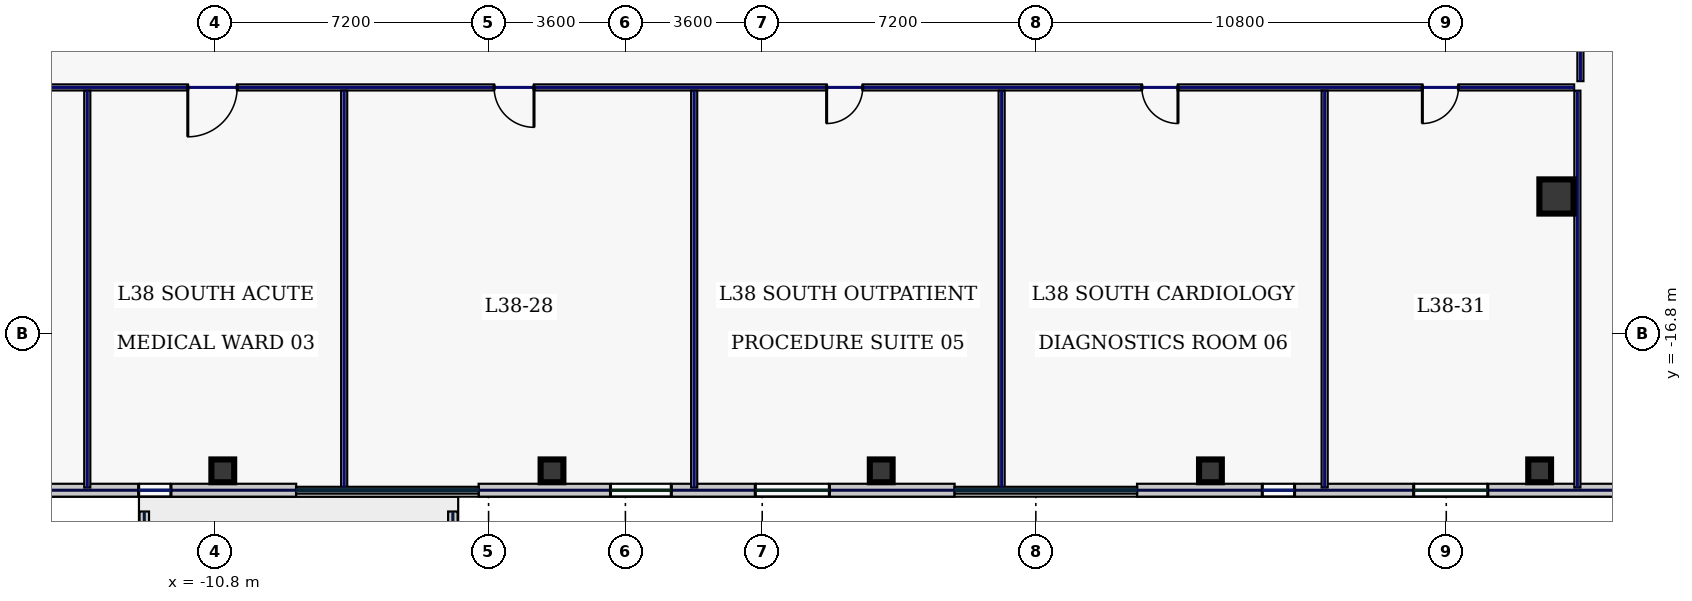
"""IFC4 building model, lengths in metres.
Left out: names, types, materials, properties, quantities, classifications, styles, units other than length and angle.
Written with IfcOpenShell. Run it as: python <this file> out.ifc"""

import sys

from ifc_helpers import new_model, si_unit, direction, frame, frame_2d, origin, origin_2d, place, context, subcontext, project, spatial, rectangle, hollow_rectangle, extrude, element, fill, save


model = new_model("IFC4")
c1 = context("Model", 3, precision=1e-05, world=origin(), true_north=direction((0.0, 1.0)))
c2 = subcontext(c1, "Body", "Model", "MODEL_VIEW")
j1 = project(units=[si_unit("LENGTHUNIT", "METRE"), si_unit("PLANEANGLEUNIT", "RADIAN")], contexts=[c1])
p1 = place(None, origin())
s1 = spatial("IfcSite", under=j1, at=p1, CompositionType="ELEMENT")
p2 = place(p1, origin())
s2 = spatial("IfcBuilding", under=s1, at=p2, CompositionType="ELEMENT")
p3 = place(p2, frame((0.0, 0.0, 168.2)))
s3 = spatial("IfcBuildingStorey", under=s2, at=p3, CompositionType="ELEMENT", Elevation=168.2)
p4 = place(p3, frame((24.5, -13.2, 0.0), z_axis=(0.0, 0.0, 1.0), x_axis=(1.0, 0.0, 0.0)))
e1 = element("IfcColumn", 1, at=p4, inside=s3, PredefinedType="COLUMN", context=c2, shape_type="SweptSolid", body=[
    extrude(hollow_rectangle(XDim=0.9, YDim=0.9, WallThickness=0.04, at=origin_2d()), origin(), (0.0, 0.0, 1.0), 3.74),
])
for number, where, z_axis, x_axis in (
    (2, (-10.594, -20.42, 0.0), (0.0, 0.0, 1.0), (1.0, 0.0, 0.0)),
    (3, (-1.931, -20.42, 0.0), (0.0, 0.0, 1.0), (1.0, 0.0, 0.0)),
    (4, (6.731, -20.42, 0.0), (0.0, 0.0, 1.0), (1.0, 0.0, 0.0)),
    (5, (15.394, -20.42, 0.0), (0.0, 0.0, 1.0), (1.0, 0.0, 0.0)),
    (6, (24.057, -20.42, 0.0), (0.0, 0.0, 1.0), (1.0, 0.0, 0.0)),
):
    element("IfcColumn", number, at=place(p3, frame(where, z_axis=z_axis, x_axis=x_axis)), inside=s3, PredefinedType="COLUMN", context=c2, shape_type="SweptSolid", body=[
        extrude(hollow_rectangle(XDim=0.6, YDim=0.6, WallThickness=0.028, at=origin_2d()), origin(), (0.0, 0.0, 1.0), 3.74),
    ])
for number, where, z_axis, x_axis in (
    (7, (-12.66, -21.49, 0.0), (0.0, 0.0, 1.0), (0.0, -1.0, 0.0)),
    (8, (-4.54, -23.67, 0.0), (0.0, 0.0, 1.0), (0.0, 1.0, 0.0)),
):
    element("IfcWall", number, at=place(p3, frame(where, z_axis=z_axis, x_axis=x_axis)), inside=s3, PredefinedType="PARAPET", context=c2, shape_type="SweptSolid", body=[
        extrude(rectangle(XDim=2.18, YDim=0.25, at=frame_2d((1.09, 0.0))), origin(), (0.0, 0.0, 1.0), 1.15),
    ])
p5 = place(p3, frame((-28.6, -20.93, 0.0), z_axis=(0.0, 0.0, 1.0), x_axis=(1.0, 0.0, 0.0)))
e9 = element("IfcWall", 9, at=p5, inside=s3, PredefinedType="STANDARD", context=c2, shape_type="SweptSolid", body=[
    extrude(rectangle(XDim=19.937, YDim=0.34, at=frame_2d((9.969, 0.0))), origin(), (0.0, 0.0, 1.0), 3.74),
])
p6 = place(p5, frame((2.044, 0.0, 0.8)))
e10 = element("IfcOpeningElement", 10, at=p6, cuts=e9, PredefinedType="OPENING", context=c2, shape_type="SweptSolid", body=[
    extrude(rectangle(XDim=0.85, YDim=1.85, at=frame_2d((0.425, 0.925))), frame((0.0, 0.18, 0.0), z_axis=(0.0, -1.0, 0.0), x_axis=(1.0, 0.0, 0.0)), (0.0, 0.0, 1.0), 0.36),
])
p7 = place(p5, frame((6.029, 0.0, 0.8)))
e11 = element("IfcOpeningElement", 11, at=p7, cuts=e9, PredefinedType="OPENING", context=c2, shape_type="SweptSolid", body=[
    extrude(rectangle(XDim=0.85, YDim=1.85, at=frame_2d((0.425, 0.925))), frame((0.0, 0.18, 0.0), z_axis=(0.0, -1.0, 0.0), x_axis=(1.0, 0.0, 0.0)), (0.0, 0.0, 1.0), 0.36),
])
p8 = place(p5, frame((10.707, 0.0, 0.8)))
e12 = element("IfcOpeningElement", 12, at=p8, cuts=e9, PredefinedType="OPENING", context=c2, shape_type="SweptSolid", body=[
    extrude(rectangle(XDim=1.95, YDim=2.1, at=frame_2d((0.975, 1.05))), frame((0.0, 0.18, 0.0), z_axis=(0.0, -1.0, 0.0), x_axis=(1.0, 0.0, 0.0)), (0.0, 0.0, 1.0), 0.36),
])
p9 = place(p5, frame((15.792, 0.0, 0.8)))
e13 = element("IfcOpeningElement", 13, at=p9, cuts=e9, PredefinedType="OPENING", context=c2, shape_type="SweptSolid", body=[
    extrude(rectangle(XDim=0.85, YDim=1.85, at=frame_2d((0.425, 0.925))), frame((0.0, 0.18, 0.0), z_axis=(0.0, -1.0, 0.0), x_axis=(1.0, 0.0, 0.0)), (0.0, 0.0, 1.0), 0.36),
])
p10 = place(p3, frame((-3.863, -20.93, 0.0), z_axis=(0.0, 0.0, 1.0), x_axis=(1.0, 0.0, 0.0)))
e14 = element("IfcWall", 14, at=p10, inside=s3, PredefinedType="STANDARD", context=c2, shape_type="SweptSolid", body=[
    extrude(rectangle(XDim=12.526, YDim=0.34, at=frame_2d((6.263, 0.0))), origin(), (0.0, 0.0, 1.0), 3.74),
])
p11 = place(p10, frame((3.47, 0.0, 0.22)))
e15 = element("IfcOpeningElement", 15, at=p11, cuts=e14, PredefinedType="OPENING", context=c2, shape_type="SweptSolid", body=[
    extrude(rectangle(XDim=1.6, YDim=1.2, at=frame_2d((0.8, 0.6))), frame((0.0, 0.18, 0.0), z_axis=(0.0, -1.0, 0.0), x_axis=(1.0, 0.0, 0.0)), (0.0, 0.0, 1.0), 0.36),
])
p12 = place(p10, frame((7.28, 0.0, 0.8)))
e16 = element("IfcOpeningElement", 16, at=p12, cuts=e14, PredefinedType="OPENING", context=c2, shape_type="SweptSolid", body=[
    extrude(rectangle(XDim=1.95, YDim=2.1, at=frame_2d((0.975, 1.05))), frame((0.0, 0.18, 0.0), z_axis=(0.0, -1.0, 0.0), x_axis=(1.0, 0.0, 0.0)), (0.0, 0.0, 1.0), 0.36),
])
p13 = place(p3, frame((13.463, -20.93, 0.0), z_axis=(0.0, 0.0, 1.0), x_axis=(1.0, 0.0, 0.0)))
e17 = element("IfcWall", 17, at=p13, inside=s3, PredefinedType="STANDARD", context=c2, shape_type="SweptSolid", body=[
    extrude(rectangle(XDim=19.937, YDim=0.34, at=frame_2d((9.969, 0.0))), origin(), (0.0, 0.0, 1.0), 3.74),
])
p14 = place(p13, frame((3.295, 0.0, 0.8)))
e18 = element("IfcOpeningElement", 18, at=p14, cuts=e17, PredefinedType="OPENING", context=c2, shape_type="SweptSolid", body=[
    extrude(rectangle(XDim=0.85, YDim=1.85, at=frame_2d((0.425, 0.925))), frame((0.0, 0.18, 0.0), z_axis=(0.0, -1.0, 0.0), x_axis=(1.0, 0.0, 0.0)), (0.0, 0.0, 1.0), 0.36),
])
p15 = place(p13, frame((7.28, 0.0, 0.8)))
e19 = element("IfcOpeningElement", 19, at=p15, cuts=e17, PredefinedType="OPENING", context=c2, shape_type="SweptSolid", body=[
    extrude(rectangle(XDim=1.95, YDim=2.1, at=frame_2d((0.975, 1.05))), frame((0.0, 0.18, 0.0), z_axis=(0.0, -1.0, 0.0), x_axis=(1.0, 0.0, 0.0)), (0.0, 0.0, 1.0), 0.36),
])
p16 = place(p13, frame((13.058, 0.0, 0.8)))
e20 = element("IfcOpeningElement", 20, at=p16, cuts=e17, PredefinedType="OPENING", context=c2, shape_type="SweptSolid", body=[
    extrude(rectangle(XDim=0.85, YDim=1.85, at=frame_2d((0.425, 0.925))), frame((0.0, 0.18, 0.0), z_axis=(0.0, -1.0, 0.0), x_axis=(1.0, 0.0, 0.0)), (0.0, 0.0, 1.0), 0.36),
])
p17 = place(p13, frame((15.943, 0.0, 0.8)))
e21 = element("IfcOpeningElement", 21, at=p17, cuts=e17, PredefinedType="OPENING", context=c2, shape_type="SweptSolid", body=[
    extrude(rectangle(XDim=1.95, YDim=2.1, at=frame_2d((0.975, 1.05))), frame((0.0, 0.18, 0.0), z_axis=(0.0, -1.0, 0.0), x_axis=(1.0, 0.0, 0.0)), (0.0, 0.0, 1.0), 0.36),
])
p18 = place(p3, frame((25.13, -7.185, 0.0), z_axis=(0.0, 0.0, 1.0), x_axis=(0.0, -1.0, 0.0)))
e22 = element("IfcWall", 22, at=p18, inside=s3, PredefinedType="PARTITIONING", context=c2, shape_type="SweptSolid", body=[
    extrude(rectangle(XDim=2.98, YDim=0.16, at=frame_2d((1.49, 0.0))), origin(), (0.0, 0.0, 1.0), 3.74),
])
p19 = place(p18, frame((1.1, 0.0, 0.0)))
e23 = element("IfcOpeningElement", 23, at=p19, cuts=e22, PredefinedType="OPENING", context=c2, shape_type="SweptSolid", body=[
    extrude(rectangle(XDim=0.95, YDim=2.2, at=frame_2d((0.475, 1.1))), frame((0.0, 0.09, 0.0), z_axis=(0.0, -1.0, 0.0), x_axis=(1.0, 0.0, 0.0)), (0.0, 0.0, 1.0), 0.18),
])
p20 = place(p3, frame((24.965, -10.33, 0.0), z_axis=(0.0, 0.0, 1.0), x_axis=(-1.0, 0.0, 0.0)))
e24 = element("IfcWall", 24, at=p20, inside=s3, PredefinedType="PARTITIONING", context=c2, shape_type="SweptSolid", body=[
    extrude(rectangle(XDim=49.93, YDim=0.16, at=frame_2d((24.965, 0.0))), origin(), (0.0, 0.0, 1.0), 3.74),
])
p21 = place(p20, frame((47.106, 0.0, 0.0)))
e25 = element("IfcOpeningElement", 25, at=p21, cuts=e24, PredefinedType="OPENING", context=c2, shape_type="SweptSolid", body=[
    extrude(rectangle(XDim=0.95, YDim=2.2, at=frame_2d((0.475, 1.1))), frame((0.0, 0.09, 0.0), z_axis=(0.0, -1.0, 0.0), x_axis=(1.0, 0.0, 0.0)), (0.0, 0.0, 1.0), 0.18),
])
p22 = place(p20, frame((41.855, 0.0, 0.0)))
e26 = element("IfcOpeningElement", 26, at=p22, cuts=e24, PredefinedType="OPENING", context=c2, shape_type="SweptSolid", body=[
    extrude(rectangle(XDim=1.15, YDim=2.2, at=frame_2d((0.575, 1.1))), frame((0.0, 0.09, 0.0), z_axis=(0.0, -1.0, 0.0), x_axis=(1.0, 0.0, 0.0)), (0.0, 0.0, 1.0), 0.18),
])
p23 = place(p20, frame((35.18, 0.0, 0.0)))
e27 = element("IfcOpeningElement", 27, at=p23, cuts=e24, PredefinedType="OPENING", context=c2, shape_type="SweptSolid", body=[
    extrude(rectangle(XDim=1.3, YDim=2.2, at=frame_2d((0.65, 1.1))), frame((0.0, 0.09, 0.0), z_axis=(0.0, -1.0, 0.0), x_axis=(1.0, 0.0, 0.0)), (0.0, 0.0, 1.0), 0.18),
])
p24 = place(p20, frame((27.37, 0.0, 0.0)))
e28 = element("IfcOpeningElement", 28, at=p24, cuts=e24, PredefinedType="OPENING", context=c2, shape_type="SweptSolid", body=[
    extrude(rectangle(XDim=1.05, YDim=2.2, at=frame_2d((0.525, 1.1))), frame((0.0, 0.09, 0.0), z_axis=(0.0, -1.0, 0.0), x_axis=(1.0, 0.0, 0.0)), (0.0, 0.0, 1.0), 0.18),
])
p25 = place(p20, frame((18.72, 0.0, 0.0)))
e29 = element("IfcOpeningElement", 29, at=p25, cuts=e24, PredefinedType="OPENING", context=c2, shape_type="SweptSolid", body=[
    extrude(rectangle(XDim=0.95, YDim=2.2, at=frame_2d((0.475, 1.1))), frame((0.0, 0.09, 0.0), z_axis=(0.0, -1.0, 0.0), x_axis=(1.0, 0.0, 0.0)), (0.0, 0.0, 1.0), 0.18),
])
p26 = place(p20, frame((10.425, 0.0, 0.0)))
e30 = element("IfcOpeningElement", 30, at=p26, cuts=e24, PredefinedType="OPENING", context=c2, shape_type="SweptSolid", body=[
    extrude(rectangle(XDim=0.95, YDim=2.2, at=frame_2d((0.475, 1.1))), frame((0.0, 0.09, 0.0), z_axis=(0.0, -1.0, 0.0), x_axis=(1.0, 0.0, 0.0)), (0.0, 0.0, 1.0), 0.18),
])
p27 = place(p20, frame((3.044, 0.0, 0.0)))
e31 = element("IfcOpeningElement", 31, at=p27, cuts=e24, PredefinedType="OPENING", context=c2, shape_type="SweptSolid", body=[
    extrude(rectangle(XDim=0.95, YDim=2.2, at=frame_2d((0.475, 1.1))), frame((0.0, 0.09, 0.0), z_axis=(0.0, -1.0, 0.0), x_axis=(1.0, 0.0, 0.0)), (0.0, 0.0, 1.0), 0.18),
])
for number, where, z_axis, x_axis in (
    (32, (25.05, -20.86, 0.0), (0.0, 0.0, 1.0), (0.0, 1.0, 0.0)),
    (33, (-14.16, -20.86, 0.0), (0.0, 0.0, 1.0), (0.0, 1.0, 0.0)),
    (34, (-7.4, -20.86, 0.0), (0.0, 0.0, 1.0), (0.0, 1.0, 0.0)),
    (35, (1.81, -20.86, 0.0), (0.0, 0.0, 1.0), (0.0, 1.0, 0.0)),
    (36, (9.9, -20.86, 0.0), (0.0, 0.0, 1.0), (0.0, 1.0, 0.0)),
    (37, (18.4, -20.86, 0.0), (0.0, 0.0, 1.0), (0.0, 1.0, 0.0)),
):
    element("IfcWall", number, at=place(p3, frame(where, z_axis=z_axis, x_axis=x_axis)), inside=s3, PredefinedType="PARTITIONING", context=c2, shape_type="SweptSolid", body=[
        extrude(rectangle(XDim=10.445, YDim=0.16, at=frame_2d((5.223, 0.0))), origin(), (0.0, 0.0, 1.0), 3.74),
    ])
p28 = place(p9, origin())
e38 = element("IfcWindow", 38, at=p28, inside=s3, PartitioningType="SINGLE_PANEL", PredefinedType="WINDOW", context=c2, shape_type="SweptSolid", body=[
    extrude(rectangle(XDim=0.85, YDim=1.85, at=frame_2d((0.425, 0.925))), frame((0.0, 0.03, 0.0), z_axis=(0.0, -1.0, 0.0), x_axis=(1.0, 0.0, 0.0)), (0.0, 0.0, 1.0), 0.06),
])
fill(e13, e38)
p29 = place(p11, origin())
e39 = element("IfcWindow", 39, at=p29, inside=s3, PartitioningType="SINGLE_PANEL", PredefinedType="WINDOW", context=c2, shape_type="SweptSolid", body=[
    extrude(rectangle(XDim=1.6, YDim=1.2, at=frame_2d((0.8, 0.6))), frame((0.0, 0.03, 0.0), z_axis=(0.0, -1.0, 0.0), x_axis=(1.0, 0.0, 0.0)), (0.0, 0.0, 1.0), 0.06),
])
fill(e15, e39)
p30 = place(p12, origin())
e40 = element("IfcWindow", 40, at=p30, inside=s3, PartitioningType="SINGLE_PANEL", PredefinedType="WINDOW", context=c2, shape_type="SweptSolid", body=[
    extrude(rectangle(XDim=1.95, YDim=2.1, at=frame_2d((0.975, 1.05))), frame((0.0, 0.03, 0.0), z_axis=(0.0, -1.0, 0.0), x_axis=(1.0, 0.0, 0.0)), (0.0, 0.0, 1.0), 0.06),
])
fill(e16, e40)
p31 = place(p14, origin())
e41 = element("IfcWindow", 41, at=p31, inside=s3, PartitioningType="SINGLE_PANEL", PredefinedType="WINDOW", context=c2, shape_type="SweptSolid", body=[
    extrude(rectangle(XDim=0.85, YDim=1.85, at=frame_2d((0.425, 0.925))), frame((0.0, 0.03, 0.0), z_axis=(0.0, -1.0, 0.0), x_axis=(1.0, 0.0, 0.0)), (0.0, 0.0, 1.0), 0.06),
])
fill(e18, e41)
p32 = place(p15, origin())
e42 = element("IfcWindow", 42, at=p32, inside=s3, PartitioningType="SINGLE_PANEL", PredefinedType="WINDOW", context=c2, shape_type="SweptSolid", body=[
    extrude(rectangle(XDim=1.95, YDim=2.1, at=frame_2d((0.975, 1.05))), frame((0.0, 0.03, 0.0), z_axis=(0.0, -1.0, 0.0), x_axis=(1.0, 0.0, 0.0)), (0.0, 0.0, 1.0), 0.06),
])
fill(e19, e42)
p33 = place(p23, origin())
e43 = element("IfcDoor", 43, at=p33, inside=s3, OperationType="SINGLE_SWING_RIGHT", PredefinedType="DOOR", context=c2, shape_type="SweptSolid", body=[
    extrude(rectangle(XDim=1.3, YDim=2.2, at=frame_2d((0.65, 1.1))), frame((0.0, 0.025, 0.0), z_axis=(0.0, -1.0, 0.0), x_axis=(1.0, 0.0, 0.0)), (0.0, 0.0, 1.0), 0.05),
])
fill(e27, e43)
p34 = place(p24, origin())
e44 = element("IfcDoor", 44, at=p34, inside=s3, OperationType="SINGLE_SWING_LEFT", PredefinedType="DOOR", context=c2, shape_type="SweptSolid", body=[
    extrude(rectangle(XDim=1.05, YDim=2.2, at=frame_2d((0.525, 1.1))), frame((0.0, 0.025, 0.0), z_axis=(0.0, -1.0, 0.0), x_axis=(1.0, 0.0, 0.0)), (0.0, 0.0, 1.0), 0.05),
])
fill(e28, e44)
p35 = place(p25, origin())
e45 = element("IfcDoor", 45, at=p35, inside=s3, OperationType="SINGLE_SWING_RIGHT", PredefinedType="DOOR", context=c2, shape_type="SweptSolid", body=[
    extrude(rectangle(XDim=0.95, YDim=2.2, at=frame_2d((0.475, 1.1))), frame((0.0, 0.025, 0.0), z_axis=(0.0, -1.0, 0.0), x_axis=(1.0, 0.0, 0.0)), (0.0, 0.0, 1.0), 0.05),
])
fill(e29, e45)
p36 = place(p26, origin())
e46 = element("IfcDoor", 46, at=p36, inside=s3, OperationType="SINGLE_SWING_LEFT", PredefinedType="DOOR", context=c2, shape_type="SweptSolid", body=[
    extrude(rectangle(XDim=0.95, YDim=2.2, at=frame_2d((0.475, 1.1))), frame((0.0, 0.025, 0.0), z_axis=(0.0, -1.0, 0.0), x_axis=(1.0, 0.0, 0.0)), (0.0, 0.0, 1.0), 0.05),
])
fill(e30, e46)
p37 = place(p27, origin())
e47 = element("IfcDoor", 47, at=p37, inside=s3, OperationType="SINGLE_SWING_RIGHT", PredefinedType="DOOR", context=c2, shape_type="SweptSolid", body=[
    extrude(rectangle(XDim=0.95, YDim=2.2, at=frame_2d((0.475, 1.1))), frame((0.0, 0.025, 0.0), z_axis=(0.0, -1.0, 0.0), x_axis=(1.0, 0.0, 0.0)), (0.0, 0.0, 1.0), 0.05),
])
fill(e31, e47)
save(model, sys.argv[1])
